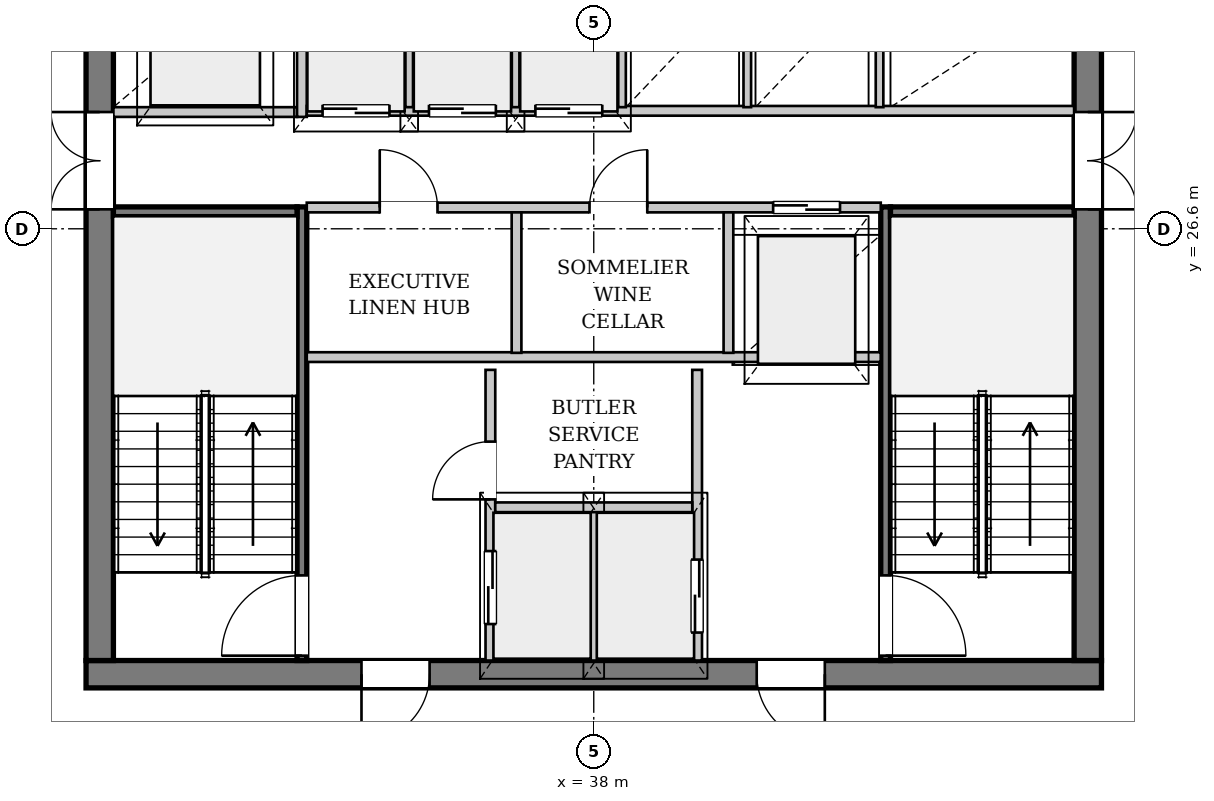
"""IFC4 building model, lengths in metres.
Left out: names, types, materials, properties, quantities, classifications, styles, units other than length and angle.
Written with IfcOpenShell. Run it as: python <this file> out.ifc"""

import sys

from ifc_helpers import new_model, si_unit, direction, frame, frame_2d, origin, place, context, subcontext, project, spatial, rectangle, extrude, source, transform, mapped, element, fill, save


model = new_model("IFC4")
c1 = context("Model", 3, precision=1e-05, world=origin(), true_north=direction((0.0, 1.0)))
c2 = subcontext(c1, "Body", "Model", "MODEL_VIEW")
j1 = project(units=[si_unit("LENGTHUNIT", "METRE"), si_unit("PLANEANGLEUNIT", "RADIAN")], contexts=[c1])
p1 = place(None, origin())
s1 = spatial("IfcSite", under=j1, at=p1, CompositionType="ELEMENT")
p2 = place(p1, origin())
s2 = spatial("IfcBuilding", under=s1, at=p2, CompositionType="ELEMENT")
p3 = place(p2, frame((0.0, 0.0, 213.15)))
s3 = spatial("IfcBuildingStorey", under=s2, at=p3, CompositionType="ELEMENT", Elevation=213.15)
p4 = place(p3, frame((52.923, 23.425, 0.0), z_axis=(0.0, 0.0, 1.0), x_axis=(-0.482829200204, -0.875714544489, 0.0)))
e1 = element("IfcWall", 1, at=p4, inside=s3, PredefinedType="SOLIDWALL", context=c2, shape_type="SweptSolid", body=[
    extrude(rectangle(XDim=23.072, YDim=0.32, at=frame_2d((11.536, 0.0))), origin(), (0.0, 0.0, 1.0), 2.822),
])
p5 = place(p4, frame((6.633, 0.0, 0.0)))
e2 = element("IfcOpeningElement", 2, at=p5, cuts=e1, PredefinedType="OPENING", context=c2, shape_type="SweptSolid", body=[
    extrude(rectangle(XDim=1.5, YDim=2.3, at=frame_2d((0.75, 1.15))), frame((0.0, 0.17, 0.0), z_axis=(0.0, -1.0, 0.0), x_axis=(1.0, 0.0, 0.0)), (0.0, 0.0, 1.0), 0.34),
])
p6 = place(p4, frame((15.773, 0.0, 0.352)))
e3 = element("IfcOpeningElement", 3, at=p6, cuts=e1, PredefinedType="OPENING", context=c2, shape_type="SweptSolid", body=[
    extrude(rectangle(XDim=2.6, YDim=2.35, at=frame_2d((1.3, 1.175))), frame((0.0, 0.17, 0.0), z_axis=(0.0, -1.0, 0.0), x_axis=(1.0, 0.0, 0.0)), (0.0, 0.0, 1.0), 0.34),
])
p7 = place(p3, frame((42.991, 3.451, 0.0), z_axis=(0.0, 0.0, 1.0), x_axis=(0.477647289854, 0.878551686866, 0.0)))
e4 = element("IfcWall", 4, at=p7, inside=s3, PredefinedType="PARAPET", context=c2, shape_type="SweptSolid", body=[
    extrude(rectangle(XDim=20.551, YDim=0.22, at=frame_2d((10.275, 0.0))), origin(), (0.0, 0.0, 1.0), 0.3),
])
p8 = place(p3, frame((46.35, 19.275, 0.0), z_axis=(0.0, 0.0, 1.0), x_axis=(-1.0, 0.0, 0.0)))
e5 = element("IfcWall", 5, at=p8, inside=s3, PredefinedType="SHEAR", context=c2, shape_type="SweptSolid", body=[
    extrude(rectangle(XDim=16.7, YDim=0.45, at=frame_2d((8.35, 0.0))), origin(), (0.0, 0.0, 1.0), 3.33),
])
p9 = place(p8, frame((4.55, 0.0, 0.0)))
e6 = element("IfcOpeningElement", 6, at=p9, cuts=e5, PredefinedType="OPENING", context=c2, shape_type="SweptSolid", body=[
    extrude(rectangle(XDim=1.12, YDim=2.25, at=frame_2d((0.56, 1.125))), frame((0.0, 0.235, 0.0), z_axis=(0.0, -1.0, 0.0), x_axis=(1.0, 0.0, 0.0)), (0.0, 0.0, 1.0), 0.47),
])
p10 = place(p8, frame((11.05, 0.0, 0.0)))
e7 = element("IfcOpeningElement", 7, at=p10, cuts=e5, PredefinedType="OPENING", context=c2, shape_type="SweptSolid", body=[
    extrude(rectangle(XDim=1.12, YDim=2.25, at=frame_2d((0.56, 1.125))), frame((0.0, 0.235, 0.0), z_axis=(0.0, -1.0, 0.0), x_axis=(1.0, 0.0, 0.0)), (0.0, 0.0, 1.0), 0.47),
])
p11 = place(p3, frame((29.875, 19.5, 0.0), z_axis=(0.0, 0.0, 1.0), x_axis=(0.0, 1.0, 0.0)))
e8 = element("IfcWall", 8, at=p11, inside=s3, PredefinedType="SHEAR", context=c2, shape_type="SweptSolid", body=[
    extrude(rectangle(XDim=14.2, YDim=0.45, at=frame_2d((7.1, 0.0))), origin(), (0.0, 0.0, 1.0), 3.33),
])
p12 = place(p11, frame((7.42, 0.0, 0.0)))
e9 = element("IfcOpeningElement", 9, at=p12, cuts=e8, PredefinedType="OPENING", context=c2, shape_type="SweptSolid", body=[
    extrude(rectangle(XDim=1.6, YDim=2.2, at=frame_2d((0.8, 1.1))), frame((0.0, 0.235, 0.0), z_axis=(0.0, -1.0, 0.0), x_axis=(1.0, 0.0, 0.0)), (0.0, 0.0, 1.0), 0.47),
])
p13 = place(p3, frame((46.125, 33.7, 0.0), z_axis=(0.0, 0.0, 1.0), x_axis=(0.0, -1.0, 0.0)))
e10 = element("IfcWall", 10, at=p13, inside=s3, PredefinedType="SHEAR", context=c2, shape_type="SweptSolid", body=[
    extrude(rectangle(XDim=14.2, YDim=0.45, at=frame_2d((7.1, 0.0))), origin(), (0.0, 0.0, 1.0), 3.33),
])
p14 = place(p13, frame((5.18, 0.0, 0.0)))
e11 = element("IfcOpeningElement", 11, at=p14, cuts=e10, PredefinedType="OPENING", context=c2, shape_type="SweptSolid", body=[
    extrude(rectangle(XDim=1.6, YDim=2.2, at=frame_2d((0.8, 1.1))), frame((0.0, 0.235, 0.0), z_axis=(0.0, -1.0, 0.0), x_axis=(1.0, 0.0, 0.0)), (0.0, 0.0, 1.0), 0.47),
])
p15 = place(p13, frame((2.05, 0.0, 0.0)))
e12 = element("IfcOpeningElement", 12, at=p15, cuts=e10, PredefinedType="OPENING", context=c2, shape_type="SweptSolid", body=[
    extrude(rectangle(XDim=0.95, YDim=2.1, at=frame_2d((0.475, 1.05))), frame((0.0, 0.235, 0.0), z_axis=(0.0, -1.0, 0.0), x_axis=(1.0, 0.0, 0.0)), (0.0, 0.0, 1.0), 0.47),
])
p16 = place(p3, frame((33.2, 19.5, 0.0), z_axis=(0.0, 0.0, 1.0), x_axis=(0.0, 1.0, 0.0)))
e13 = element("IfcWall", 13, at=p16, inside=s3, PredefinedType="PARTITIONING", context=c2, shape_type="SweptSolid", body=[
    extrude(rectangle(XDim=7.46, YDim=0.16, at=frame_2d((3.73, 0.0))), origin(), (0.0, 0.0, 1.0), 3.33),
])
p17 = place(p16, frame((0.08, 0.0, 0.0)))
e14 = element("IfcOpeningElement", 14, at=p17, cuts=e13, PredefinedType="OPENING", context=c2, shape_type="SweptSolid", body=[
    extrude(rectangle(XDim=1.32, YDim=2.2, at=frame_2d((0.66, 1.1))), frame((0.0, 0.09, 0.0), z_axis=(0.0, -1.0, 0.0), x_axis=(1.0, 0.0, 0.0)), (0.0, 0.0, 1.0), 0.18),
])
p18 = place(p3, frame((30.1, 26.88, 0.0), z_axis=(0.0, 0.0, 1.0), x_axis=(1.0, 0.0, 0.0)))
e15 = element("IfcWall", 15, at=p18, inside=s3, PredefinedType="PARTITIONING", context=c2, shape_type="SweptSolid", body=[
    extrude(rectangle(XDim=3.02, YDim=0.16, at=frame_2d((1.51, 0.0))), origin(), (0.0, 0.0, 1.0), 3.33),
])
p19 = place(p3, frame((42.8, 26.96, 0.0), z_axis=(0.0, 0.0, 1.0), x_axis=(0.0, -1.0, 0.0)))
e16 = element("IfcWall", 16, at=p19, inside=s3, PredefinedType="PARTITIONING", context=c2, shape_type="SweptSolid", body=[
    extrude(rectangle(XDim=7.46, YDim=0.16, at=frame_2d((3.73, 0.0))), origin(), (0.0, 0.0, 1.0), 3.33),
])
p20 = place(p19, frame((6.06, 0.0, 0.0)))
e17 = element("IfcOpeningElement", 17, at=p20, cuts=e16, PredefinedType="OPENING", context=c2, shape_type="SweptSolid", body=[
    extrude(rectangle(XDim=1.32, YDim=2.2, at=frame_2d((0.66, 1.1))), frame((0.0, 0.09, 0.0), z_axis=(0.0, -1.0, 0.0), x_axis=(1.0, 0.0, 0.0)), (0.0, 0.0, 1.0), 0.18),
])
p21 = place(p3, frame((42.88, 26.88, 0.0), z_axis=(0.0, 0.0, 1.0), x_axis=(1.0, 0.0, 0.0)))
e18 = element("IfcWall", 18, at=p21, inside=s3, PredefinedType="PARTITIONING", context=c2, shape_type="SweptSolid", body=[
    extrude(rectangle(XDim=3.02, YDim=0.16, at=frame_2d((1.51, 0.0))), origin(), (0.0, 0.0, 1.0), 3.33),
])
p22 = place(p3, frame((36.3, 19.5, 0.0), z_axis=(0.0, 0.0, 1.0), x_axis=(0.0, 1.0, 0.0)))
e19 = element("IfcWall", 19, at=p22, inside=s3, PredefinedType="PARTITIONING", context=c2, shape_type="SweptSolid", body=[
    extrude(rectangle(XDim=4.78, YDim=0.16, at=frame_2d((2.39, 0.0))), origin(), (0.0, 0.0, 1.0), 3.33),
])
p23 = place(p22, frame((0.6, 0.0, 0.0)))
e20 = element("IfcOpeningElement", 20, at=p23, cuts=e19, PredefinedType="OPENING", context=c2, shape_type="SweptSolid", body=[
    extrude(rectangle(XDim=1.2, YDim=2.2, at=frame_2d((0.6, 1.1))), frame((0.0, 0.09, 0.0), z_axis=(0.0, -1.0, 0.0), x_axis=(1.0, 0.0, 0.0)), (0.0, 0.0, 1.0), 0.18),
])
p24 = place(p22, frame((2.65, 0.0, 0.0)))
e21 = element("IfcOpeningElement", 21, at=p24, cuts=e19, PredefinedType="OPENING", context=c2, shape_type="SweptSolid", body=[
    extrude(rectangle(XDim=0.95, YDim=2.1, at=frame_2d((0.475, 1.05))), frame((0.0, 0.09, 0.0), z_axis=(0.0, -1.0, 0.0), x_axis=(1.0, 0.0, 0.0)), (0.0, 0.0, 1.0), 0.18),
])
p25 = place(p3, frame((39.7, 24.28, 0.0), z_axis=(0.0, 0.0, 1.0), x_axis=(0.0, -1.0, 0.0)))
e22 = element("IfcWall", 22, at=p25, inside=s3, PredefinedType="PARTITIONING", context=c2, shape_type="SweptSolid", body=[
    extrude(rectangle(XDim=4.78, YDim=0.16, at=frame_2d((2.39, 0.0))), origin(), (0.0, 0.0, 1.0), 3.33),
])
p26 = place(p25, frame((3.12, 0.0, 0.0)))
e23 = element("IfcOpeningElement", 23, at=p26, cuts=e22, PredefinedType="OPENING", context=c2, shape_type="SweptSolid", body=[
    extrude(rectangle(XDim=1.2, YDim=2.2, at=frame_2d((0.6, 1.1))), frame((0.0, 0.09, 0.0), z_axis=(0.0, -1.0, 0.0), x_axis=(1.0, 0.0, 0.0)), (0.0, 0.0, 1.0), 0.18),
])
p27 = place(p3, frame((38.0, 19.5, 0.0), z_axis=(0.0, 0.0, 1.0), x_axis=(0.0, 1.0, 0.0)))
e24 = element("IfcWall", 24, at=p27, inside=s3, PredefinedType="PARTITIONING", context=c2, shape_type="SweptSolid", body=[
    extrude(rectangle(XDim=2.46, YDim=0.125, at=frame_2d((1.23, 0.0))), origin(), (0.0, 0.0, 1.0), 3.33),
])
p28 = place(p3, frame((36.38, 22.02, 0.0), z_axis=(0.0, 0.0, 1.0), x_axis=(1.0, 0.0, 0.0)))
e25 = element("IfcWall", 25, at=p28, inside=s3, PredefinedType="PARTITIONING", context=c2, shape_type="SweptSolid", body=[
    extrude(rectangle(XDim=3.24, YDim=0.16, at=frame_2d((1.62, 0.0))), origin(), (0.0, 0.0, 1.0), 3.33),
])
p29 = place(p3, frame((33.28, 24.49, 0.0), z_axis=(0.0, 0.0, 1.0), x_axis=(1.0, 0.0, 0.0)))
e26 = element("IfcWall", 26, at=p29, inside=s3, PredefinedType="PARTITIONING", context=c2, shape_type="SweptSolid", body=[
    extrude(rectangle(XDim=9.44, YDim=0.16, at=frame_2d((4.72, 0.0))), origin(), (0.0, 0.0, 1.0), 3.33),
])
p30 = place(p3, frame((30.1, 28.52, 0.0), z_axis=(0.0, 0.0, 1.0), x_axis=(1.0, 0.0, 0.0)))
e27 = element("IfcWall", 27, at=p30, inside=s3, PredefinedType="PARTITIONING", context=c2, shape_type="SweptSolid", body=[
    extrude(rectangle(XDim=3.02, YDim=0.16, at=frame_2d((1.51, 0.0))), origin(), (0.0, 0.0, 1.0), 3.33),
])
p31 = place(p3, frame((33.2, 28.44, 0.0), z_axis=(0.0, 0.0, 1.0), x_axis=(0.0, 1.0, 0.0)))
e28 = element("IfcWall", 28, at=p31, inside=s3, PredefinedType="PARTITIONING", context=c2, shape_type="SweptSolid", body=[
    extrude(rectangle(XDim=5.26, YDim=0.16, at=frame_2d((2.63, 0.0))), origin(), (0.0, 0.0, 1.0), 3.33),
])
p32 = place(p3, frame((33.28, 26.95, 0.0), z_axis=(0.0, 0.0, 1.0), x_axis=(1.0, 0.0, 0.0)))
e29 = element("IfcWall", 29, at=p32, inside=s3, PredefinedType="PARTITIONING", context=c2, shape_type="SweptSolid", body=[
    extrude(rectangle(XDim=9.44, YDim=0.16, at=frame_2d((4.72, 0.0))), origin(), (0.0, 0.0, 1.0), 3.33),
])
p33 = place(p32, frame((1.2, 0.0, 0.0)))
e30 = element("IfcOpeningElement", 30, at=p33, cuts=e29, PredefinedType="OPENING", context=c2, shape_type="SweptSolid", body=[
    extrude(rectangle(XDim=0.95, YDim=2.1, at=frame_2d((0.475, 1.05))), frame((0.0, 0.09, 0.0), z_axis=(0.0, -1.0, 0.0), x_axis=(1.0, 0.0, 0.0)), (0.0, 0.0, 1.0), 0.18),
])
p34 = place(p32, frame((4.65, 0.0, 0.0)))
e31 = element("IfcOpeningElement", 31, at=p34, cuts=e29, PredefinedType="OPENING", context=c2, shape_type="SweptSolid", body=[
    extrude(rectangle(XDim=0.95, YDim=2.1, at=frame_2d((0.475, 1.05))), frame((0.0, 0.09, 0.0), z_axis=(0.0, -1.0, 0.0), x_axis=(1.0, 0.0, 0.0)), (0.0, 0.0, 1.0), 0.18),
])
p35 = place(p32, frame((7.67, 0.0, 0.0)))
e32 = element("IfcOpeningElement", 32, at=p35, cuts=e29, PredefinedType="OPENING", context=c2, shape_type="SweptSolid", body=[
    extrude(rectangle(XDim=1.1, YDim=2.2, at=frame_2d((0.55, 1.1))), frame((0.0, 0.09, 0.0), z_axis=(0.0, -1.0, 0.0), x_axis=(1.0, 0.0, 0.0)), (0.0, 0.0, 1.0), 0.18),
])
for number, where, z_axis, x_axis in (
    (33, (36.73, 24.56, 0.0), (0.0, 0.0, 1.0), (0.0, 1.0, 0.0)),
    (34, (40.215, 24.56, 0.0), (0.0, 0.0, 1.0), (0.0, 1.0, 0.0)),
):
    element("IfcWall", number, at=place(p3, frame(where, z_axis=z_axis, x_axis=x_axis)), inside=s3, PredefinedType="PARTITIONING", context=c2, shape_type="SweptSolid", body=[
        extrude(rectangle(XDim=2.31, YDim=0.16, at=frame_2d((1.155, 0.0))), origin(), (0.0, 0.0, 1.0), 3.33),
    ])
p36 = place(p3, frame((33.28, 28.54, 0.0), z_axis=(0.0, 0.0, 1.0), x_axis=(1.0, 0.0, 0.0)))
e35 = element("IfcWall", 35, at=p36, inside=s3, PredefinedType="PARTITIONING", context=c2, shape_type="SweptSolid", body=[
    extrude(rectangle(XDim=12.62, YDim=0.16, at=frame_2d((6.31, 0.0))), origin(), (0.0, 0.0, 1.0), 3.33),
])
p37 = place(p36, frame((0.26, 0.0, 0.0)))
e36 = element("IfcOpeningElement", 36, at=p37, cuts=e35, PredefinedType="OPENING", context=c2, shape_type="SweptSolid", body=[
    extrude(rectangle(XDim=1.1, YDim=2.2, at=frame_2d((0.55, 1.1))), frame((0.0, 0.09, 0.0), z_axis=(0.0, -1.0, 0.0), x_axis=(1.0, 0.0, 0.0)), (0.0, 0.0, 1.0), 0.18),
])
p38 = place(p36, frame((2.01, 0.0, 0.0)))
e37 = element("IfcOpeningElement", 37, at=p38, cuts=e35, PredefinedType="OPENING", context=c2, shape_type="SweptSolid", body=[
    extrude(rectangle(XDim=1.1, YDim=2.2, at=frame_2d((0.55, 1.1))), frame((0.0, 0.09, 0.0), z_axis=(0.0, -1.0, 0.0), x_axis=(1.0, 0.0, 0.0)), (0.0, 0.0, 1.0), 0.18),
])
p39 = place(p36, frame((3.76, 0.0, 0.0)))
e38 = element("IfcOpeningElement", 38, at=p39, cuts=e35, PredefinedType="OPENING", context=c2, shape_type="SweptSolid", body=[
    extrude(rectangle(XDim=1.1, YDim=2.2, at=frame_2d((0.55, 1.1))), frame((0.0, 0.09, 0.0), z_axis=(0.0, -1.0, 0.0), x_axis=(1.0, 0.0, 0.0)), (0.0, 0.0, 1.0), 0.18),
])
for number, where, z_axis, x_axis in (
    (39, (34.965, 28.6, 0.0), (0.0, 0.0, 1.0), (0.0, 1.0, 0.0)),
    (40, (36.715, 28.6, 0.0), (0.0, 0.0, 1.0), (0.0, 1.0, 0.0)),
    (41, (38.465, 28.6, 0.0), (0.0, 0.0, 1.0), (0.0, 1.0, 0.0)),
    (42, (40.525, 28.6, 0.0), (0.0, 0.0, 1.0), (0.0, 1.0, 0.0)),
    (43, (42.7, 28.6, 0.0), (0.0, 0.0, 1.0), (0.0, 1.0, 0.0)),
):
    element("IfcWall", number, at=place(p3, frame(where, z_axis=z_axis, x_axis=x_axis)), inside=s3, PredefinedType="PARTITIONING", context=c2, shape_type="SweptSolid", body=[
        extrude(rectangle(XDim=1.92, YDim=0.125, at=frame_2d((0.96, 0.0))), origin(), (0.0, 0.0, 1.0), 3.33),
    ])
m1 = source(origin(), c2, "Body", "SweptSolid", [
    extrude(rectangle(XDim=1.12, YDim=2.25, at=frame_2d((0.56, 1.125))), frame((0.0, 0.025, 0.0), z_axis=(0.0, -1.0, 0.0), x_axis=(1.0, 0.0, 0.0)), (0.0, 0.0, 1.0), 0.05),
])
p40 = place(p9, origin())
e44 = element("IfcDoor", 44, at=p40, inside=s3, OperationType="SINGLE_SWING_LEFT", PredefinedType="DOOR", context=c2, shape_type="MappedRepresentation", body=[
    mapped(m1, transform((0.0, 0.0, 0.0), x_axis=(1.0, 0.0, 0.0), y_axis=(0.0, 1.0, 0.0), z_axis=(0.0, 0.0, 1.0), scale=1.0)),
])
fill(e6, e44)
p41 = place(p10, origin())
e45 = element("IfcDoor", 45, at=p41, inside=s3, OperationType="SINGLE_SWING_RIGHT", PredefinedType="DOOR", context=c2, shape_type="MappedRepresentation", body=[
    mapped(m1, transform((0.0, 0.0, 0.0), x_axis=(1.0, 0.0, 0.0), y_axis=(0.0, 1.0, 0.0), z_axis=(0.0, 0.0, 1.0), scale=1.0)),
])
fill(e7, e45)
m2 = source(origin(), c2, "Body", "SweptSolid", [
    extrude(rectangle(XDim=1.6, YDim=2.2, at=frame_2d((0.8, 1.1))), frame((0.0, 0.025, 0.0), z_axis=(0.0, -1.0, 0.0), x_axis=(1.0, 0.0, 0.0)), (0.0, 0.0, 1.0), 0.05),
])
p42 = place(p12, origin())
e46 = element("IfcDoor", 46, at=p42, inside=s3, OperationType="DOUBLE_DOOR_SINGLE_SWING", PredefinedType="DOOR", context=c2, shape_type="MappedRepresentation", body=[
    mapped(m2, transform((0.0, 0.0, 0.0), x_axis=(1.0, 0.0, 0.0), y_axis=(0.0, 1.0, 0.0), z_axis=(0.0, 0.0, 1.0), scale=1.0)),
])
fill(e9, e46)
p43 = place(p14, origin())
e47 = element("IfcDoor", 47, at=p43, inside=s3, OperationType="DOUBLE_DOOR_SINGLE_SWING", PredefinedType="DOOR", context=c2, shape_type="MappedRepresentation", body=[
    mapped(m2, transform((0.0, 0.0, 0.0), x_axis=(1.0, 0.0, 0.0), y_axis=(0.0, 1.0, 0.0), z_axis=(0.0, 0.0, 1.0), scale=1.0)),
])
fill(e11, e47)
m3 = source(origin(), c2, "Body", "SweptSolid", [
    extrude(rectangle(XDim=1.32, YDim=2.2, at=frame_2d((0.66, 1.1))), frame((0.0, 0.025, 0.0), z_axis=(0.0, -1.0, 0.0), x_axis=(1.0, 0.0, 0.0)), (0.0, 0.0, 1.0), 0.05),
])
p44 = place(p17, origin())
e48 = element("IfcDoor", 48, at=p44, inside=s3, OperationType="SINGLE_SWING_LEFT", PredefinedType="DOOR", context=c2, shape_type="MappedRepresentation", body=[
    mapped(m3, transform((0.0, 0.0, 0.0), x_axis=(1.0, 0.0, 0.0), y_axis=(0.0, 1.0, 0.0), z_axis=(0.0, 0.0, 1.0), scale=1.0)),
])
fill(e14, e48)
p45 = place(p20, origin())
e49 = element("IfcDoor", 49, at=p45, inside=s3, OperationType="SINGLE_SWING_RIGHT", PredefinedType="DOOR", context=c2, shape_type="MappedRepresentation", body=[
    mapped(m3, transform((0.0, 0.0, 0.0), x_axis=(1.0, 0.0, 0.0), y_axis=(0.0, 1.0, 0.0), z_axis=(0.0, 0.0, 1.0), scale=1.0)),
])
fill(e17, e49)
m4 = source(origin(), c2, "Body", "SweptSolid", [
    extrude(rectangle(XDim=1.2, YDim=2.2, at=frame_2d((0.6, 1.1))), frame((0.0, 0.025, 0.0), z_axis=(0.0, -1.0, 0.0), x_axis=(1.0, 0.0, 0.0)), (0.0, 0.0, 1.0), 0.05),
])
p46 = place(p23, origin())
e50 = element("IfcDoor", 50, at=p46, inside=s3, OperationType="DOUBLE_DOOR_SLIDING", PredefinedType="DOOR", context=c2, shape_type="MappedRepresentation", body=[
    mapped(m4, transform((0.0, 0.0, 0.0), x_axis=(1.0, 0.0, 0.0), y_axis=(0.0, 1.0, 0.0), z_axis=(0.0, 0.0, 1.0), scale=1.0)),
])
fill(e20, e50)
m5 = source(origin(), c2, "Body", "SweptSolid", [
    extrude(rectangle(XDim=0.95, YDim=2.1, at=frame_2d((0.475, 1.05))), frame((0.0, 0.025, 0.0), z_axis=(0.0, -1.0, 0.0), x_axis=(1.0, 0.0, 0.0)), (0.0, 0.0, 1.0), 0.05),
])
p47 = place(p24, origin())
e51 = element("IfcDoor", 51, at=p47, inside=s3, OperationType="SINGLE_SWING_LEFT", PredefinedType="DOOR", context=c2, shape_type="MappedRepresentation", body=[
    mapped(m5, transform((0.0, 0.0, 0.0), x_axis=(1.0, 0.0, 0.0), y_axis=(0.0, 1.0, 0.0), z_axis=(0.0, 0.0, 1.0), scale=1.0)),
])
fill(e21, e51)
p48 = place(p26, origin())
e52 = element("IfcDoor", 52, at=p48, inside=s3, OperationType="DOUBLE_DOOR_SLIDING", PredefinedType="DOOR", context=c2, shape_type="MappedRepresentation", body=[
    mapped(m4, transform((0.0, 0.0, 0.0), x_axis=(1.0, 0.0, 0.0), y_axis=(0.0, 1.0, 0.0), z_axis=(0.0, 0.0, 1.0), scale=1.0)),
])
fill(e23, e52)
p49 = place(p33, origin())
e53 = element("IfcDoor", 53, at=p49, inside=s3, OperationType="SINGLE_SWING_LEFT", PredefinedType="DOOR", context=c2, shape_type="MappedRepresentation", body=[
    mapped(m5, transform((0.0, 0.0, 0.0), x_axis=(1.0, 0.0, 0.0), y_axis=(0.0, 1.0, 0.0), z_axis=(0.0, 0.0, 1.0), scale=1.0)),
])
fill(e30, e53)
p50 = place(p34, origin())
e54 = element("IfcDoor", 54, at=p50, inside=s3, OperationType="SINGLE_SWING_RIGHT", PredefinedType="DOOR", context=c2, shape_type="MappedRepresentation", body=[
    mapped(m5, transform((0.0, 0.0, 0.0), x_axis=(1.0, 0.0, 0.0), y_axis=(0.0, 1.0, 0.0), z_axis=(0.0, 0.0, 1.0), scale=1.0)),
])
fill(e31, e54)
m6 = source(origin(), c2, "Body", "SweptSolid", [
    extrude(rectangle(XDim=1.1, YDim=2.2, at=frame_2d((0.55, 1.1))), frame((0.0, 0.025, 0.0), z_axis=(0.0, -1.0, 0.0), x_axis=(1.0, 0.0, 0.0)), (0.0, 0.0, 1.0), 0.05),
])
p51 = place(p35, origin())
e55 = element("IfcDoor", 55, at=p51, inside=s3, OperationType="DOUBLE_DOOR_SLIDING", PredefinedType="DOOR", context=c2, shape_type="MappedRepresentation", body=[
    mapped(m6, transform((0.0, 0.0, 0.0), x_axis=(1.0, 0.0, 0.0), y_axis=(0.0, 1.0, 0.0), z_axis=(0.0, 0.0, 1.0), scale=1.0)),
])
fill(e32, e55)
p52 = place(p37, origin())
e56 = element("IfcDoor", 56, at=p52, inside=s3, OperationType="DOUBLE_DOOR_SLIDING", PredefinedType="DOOR", context=c2, shape_type="MappedRepresentation", body=[
    mapped(m6, transform((0.0, 0.0, 0.0), x_axis=(1.0, 0.0, 0.0), y_axis=(0.0, 1.0, 0.0), z_axis=(0.0, 0.0, 1.0), scale=1.0)),
])
fill(e36, e56)
p53 = place(p38, origin())
e57 = element("IfcDoor", 57, at=p53, inside=s3, OperationType="DOUBLE_DOOR_SLIDING", PredefinedType="DOOR", context=c2, shape_type="MappedRepresentation", body=[
    mapped(m6, transform((0.0, 0.0, 0.0), x_axis=(1.0, 0.0, 0.0), y_axis=(0.0, 1.0, 0.0), z_axis=(0.0, 0.0, 1.0), scale=1.0)),
])
fill(e37, e57)
p54 = place(p39, origin())
e58 = element("IfcDoor", 58, at=p54, inside=s3, OperationType="DOUBLE_DOOR_SLIDING", PredefinedType="DOOR", context=c2, shape_type="MappedRepresentation", body=[
    mapped(m6, transform((0.0, 0.0, 0.0), x_axis=(1.0, 0.0, 0.0), y_axis=(0.0, 1.0, 0.0), z_axis=(0.0, 0.0, 1.0), scale=1.0)),
])
fill(e38, e58)
save(model, sys.argv[1])
